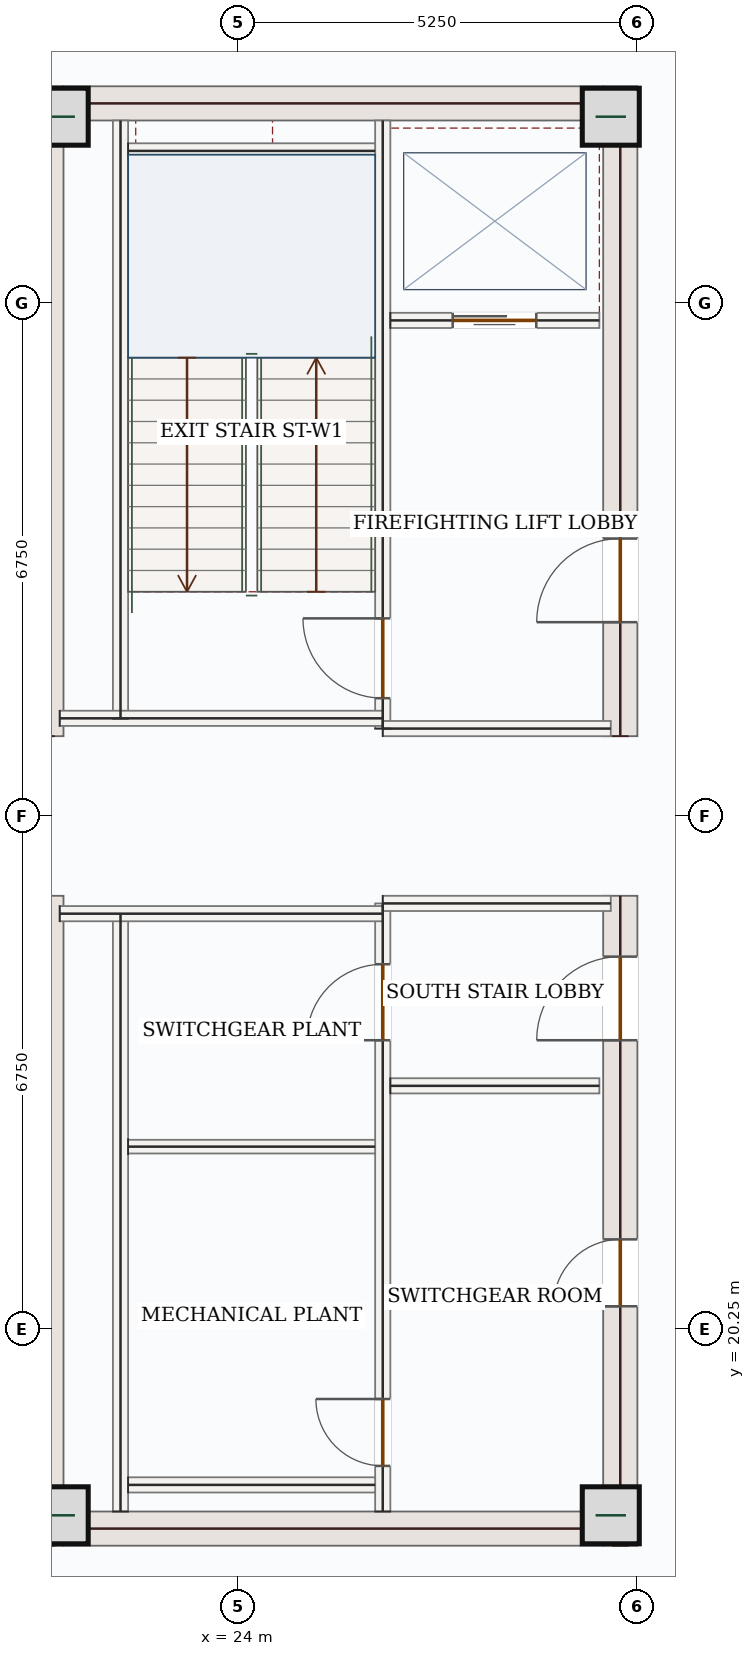
"""IFC4 building model, lengths in metres.
Left out: names, types, materials, properties, quantities, classifications, styles, units other than length and angle.
Written with IfcOpenShell. Run it as: python <this file> out.ifc"""

import sys

from ifc_helpers import new_model, si_unit, direction, frame, frame_2d, origin, origin_2d, place, context, subcontext, project, spatial, rectangle, extrude, source, transform, mapped, element, fill, save


model = new_model("IFC4")
c1 = context("Model", 3, precision=1e-05, world=origin(), true_north=direction((0.0, 1.0)))
c2 = subcontext(c1, "Body", "Model", "MODEL_VIEW")
j1 = project(units=[si_unit("LENGTHUNIT", "METRE"), si_unit("PLANEANGLEUNIT", "RADIAN")], contexts=[c1])
p1 = place(None, origin())
s1 = spatial("IfcSite", under=j1, at=p1, CompositionType="ELEMENT")
p2 = place(p1, origin())
s2 = spatial("IfcBuilding", under=s1, at=p2, CompositionType="ELEMENT")
p3 = place(p2, frame((0.0, 0.0, 375.15)))
s3 = spatial("IfcBuildingStorey", under=s2, at=p3, CompositionType="ELEMENT", Elevation=375.15)
m1 = source(origin(), c2, "Body", "SweptSolid", [
    extrude(rectangle(XDim=8.55, YDim=0.45, at=frame_2d((4.275, 0.0))), origin(), (0.0, 0.0, 1.0), 4.25),
])
for number, where, z_axis, x_axis in (
    (1, (21.475, 17.4, 0.0), (0.0, 0.0, 1.0), (0.0, 1.0, 0.0)),
    (2, (21.475, 28.05, 0.0), (0.0, 0.0, 1.0), (0.0, 1.0, 0.0)),
):
    element("IfcWall", number, at=place(p3, frame(where, z_axis=z_axis, x_axis=x_axis)), inside=s3, PredefinedType="SHEAR", context=c2, shape_type="MappedRepresentation", body=[
        mapped(m1, transform((0.0, 0.0, 0.0), x_axis=(1.0, 0.0, 0.0), y_axis=(0.0, 1.0, 0.0), z_axis=(0.0, 0.0, 1.0), scale=1.0)),
    ])
p4 = place(p3, frame((29.025, 17.4, 0.0), z_axis=(0.0, 0.0, 1.0), x_axis=(0.0, 1.0, 0.0)))
e3 = element("IfcWall", 3, at=p4, inside=s3, PredefinedType="SHEAR", context=c2, shape_type="SweptSolid", body=[
    extrude(rectangle(XDim=8.55, YDim=0.45, at=frame_2d((4.275, 0.0))), origin(), (0.0, 0.0, 1.0), 4.25),
])
p5 = place(p4, frame((6.65, 0.0, 0.0)))
e4 = element("IfcOpeningElement", 4, at=p5, cuts=e3, PredefinedType="OPENING", context=c2, shape_type="SweptSolid", body=[
    extrude(rectangle(XDim=1.1, YDim=2.2, at=frame_2d((0.55, 1.1))), frame((0.0, 0.235, 0.0), z_axis=(0.0, -1.0, 0.0), x_axis=(1.0, 0.0, 0.0)), (0.0, 0.0, 1.0), 0.47),
])
p6 = place(p4, frame((3.15, 0.0, 0.0)))
e5 = element("IfcOpeningElement", 5, at=p6, cuts=e3, PredefinedType="OPENING", context=c2, shape_type="SweptSolid", body=[
    extrude(rectangle(XDim=0.88, YDim=2.1, at=frame_2d((0.44, 1.05))), frame((0.0, 0.235, 0.0), z_axis=(0.0, -1.0, 0.0), x_axis=(1.0, 0.0, 0.0)), (0.0, 0.0, 1.0), 0.47),
])
p7 = place(p3, frame((29.025, 28.05, 0.0), z_axis=(0.0, 0.0, 1.0), x_axis=(0.0, 1.0, 0.0)))
e6 = element("IfcWall", 6, at=p7, inside=s3, PredefinedType="SHEAR", context=c2, shape_type="SweptSolid", body=[
    extrude(rectangle(XDim=8.55, YDim=0.45, at=frame_2d((4.275, 0.0))), origin(), (0.0, 0.0, 1.0), 4.25),
])
p8 = place(p7, frame((1.5, 0.0, 0.0)))
e7 = element("IfcOpeningElement", 7, at=p8, cuts=e6, PredefinedType="OPENING", context=c2, shape_type="SweptSolid", body=[
    extrude(rectangle(XDim=1.1, YDim=2.2, at=frame_2d((0.55, 1.1))), frame((0.0, 0.235, 0.0), z_axis=(0.0, -1.0, 0.0), x_axis=(1.0, 0.0, 0.0)), (0.0, 0.0, 1.0), 0.47),
])
m2 = source(origin(), c2, "Body", "SweptSolid", [
    extrude(rectangle(XDim=7.1, YDim=0.45, at=frame_2d((3.55, 0.0))), origin(), (0.0, 0.0, 1.0), 4.25),
])
for number, where, z_axis, x_axis in (
    (8, (21.7, 17.625, 0.0), (0.0, 0.0, 1.0), (1.0, 0.0, 0.0)),
    (9, (21.7, 36.375, 0.0), (0.0, 0.0, 1.0), (1.0, 0.0, 0.0)),
):
    element("IfcWall", number, at=place(p3, frame(where, z_axis=z_axis, x_axis=x_axis)), inside=s3, PredefinedType="SHEAR", context=c2, shape_type="MappedRepresentation", body=[
        mapped(m2, transform((0.0, 0.0, 0.0), x_axis=(1.0, 0.0, 0.0), y_axis=(0.0, 1.0, 0.0), z_axis=(0.0, 0.0, 1.0), scale=1.0)),
    ])
m3 = source(origin(), c2, "Body", "SweptSolid", [
    extrude(rectangle(XDim=0.75, YDim=0.75, at=origin_2d()), origin(), (0.0, 0.0, 1.0), 4.5),
])
for number, where, z_axis, x_axis in (
    (10, (21.65, 17.8, 0.0), (0.0, 0.0, 1.0), (1.0, 0.0, 0.0)),
    (11, (28.9, 17.8, 0.0), (0.0, 0.0, 1.0), (1.0, 0.0, 0.0)),
    (12, (21.65, 36.2, 0.0), (0.0, 0.0, 1.0), (1.0, 0.0, 0.0)),
    (13, (28.9, 36.2, 0.0), (0.0, 0.0, 1.0), (1.0, 0.0, 0.0)),
):
    element("IfcColumn", number, at=place(p3, frame(where, z_axis=z_axis, x_axis=x_axis)), inside=s3, PredefinedType="COLUMN", context=c2, shape_type="MappedRepresentation", body=[
        mapped(m3, transform((0.0, 0.0, 0.0), x_axis=(1.0, 0.0, 0.0), y_axis=(0.0, 1.0, 0.0), z_axis=(0.0, 0.0, 1.0), scale=1.0)),
    ])
m4 = source(origin(), c2, "Body", "SweptSolid", [
    extrude(rectangle(XDim=5.258, YDim=0.26, at=frame_2d((2.629, 0.0))), origin(), (0.0, 0.0, 1.0), 4.25),
])
for number, where, z_axis, x_axis in (
    (14, (22.658, 14.74, 0.0), (0.0, 0.0, 1.0), (-0.707, 0.707, 0.0)),
    (15, (18.94, 35.542, 0.0), (0.0, 0.0, 1.0), (0.707, 0.707, 0.0)),
):
    element("IfcWall", number, at=place(p3, frame(where, z_axis=z_axis, x_axis=x_axis)), inside=s3, PredefinedType="SOLIDWALL", context=c2, shape_type="MappedRepresentation", body=[
        mapped(m4, transform((0.0, 0.0, 0.0), x_axis=(1.0, 0.0, 0.0), y_axis=(0.0, 1.0, 0.0), z_axis=(0.0, 0.0, 1.0), scale=1.0)),
    ])
m5 = source(origin(), c2, "Body", "SweptSolid", [
    extrude(rectangle(XDim=7.87, YDim=0.2, at=frame_2d((3.935, 0.0))), origin(), (0.0, 0.0, 1.0), 4.25),
])
for number, where, z_axis, x_axis in (
    (16, (22.45, 17.85, 0.0), (0.0, 0.0, 1.0), (0.0, 1.0, 0.0)),
    (17, (22.45, 28.28, 0.0), (0.0, 0.0, 1.0), (0.0, 1.0, 0.0)),
):
    element("IfcWall", number, at=place(p3, frame(where, z_axis=z_axis, x_axis=x_axis)), inside=s3, PredefinedType="SOLIDWALL", context=c2, shape_type="MappedRepresentation", body=[
        mapped(m5, transform((0.0, 0.0, 0.0), x_axis=(1.0, 0.0, 0.0), y_axis=(0.0, 1.0, 0.0), z_axis=(0.0, 0.0, 1.0), scale=1.0)),
    ])
p9 = place(p3, frame((25.9, 17.85, 0.0), z_axis=(0.0, 0.0, 1.0), x_axis=(0.0, 1.0, 0.0)))
e18 = element("IfcWall", 18, at=p9, inside=s3, PredefinedType="SOLIDWALL", context=c2, shape_type="SweptSolid", body=[
    extrude(rectangle(XDim=8.0, YDim=0.2, at=frame_2d((4.0, 0.0))), origin(), (0.0, 0.0, 1.0), 4.25),
])
p10 = place(p9, frame((6.2, 0.0, 0.0)))
e19 = element("IfcOpeningElement", 19, at=p10, cuts=e18, PredefinedType="OPENING", context=c2, shape_type="SweptSolid", body=[
    extrude(rectangle(XDim=1.0, YDim=2.15, at=frame_2d((0.5, 1.075))), frame((0.0, 0.11, 0.0), z_axis=(0.0, -1.0, 0.0), x_axis=(1.0, 0.0, 0.0)), (0.0, 0.0, 1.0), 0.22),
])
p11 = place(p9, frame((0.6, 0.0, 0.0)))
e20 = element("IfcOpeningElement", 20, at=p11, cuts=e18, PredefinedType="OPENING", context=c2, shape_type="SweptSolid", body=[
    extrude(rectangle(XDim=0.88, YDim=2.1, at=frame_2d((0.44, 1.05))), frame((0.0, 0.11, 0.0), z_axis=(0.0, -1.0, 0.0), x_axis=(1.0, 0.0, 0.0)), (0.0, 0.0, 1.0), 0.22),
])
p12 = place(p3, frame((25.9, 28.15, 0.0), z_axis=(0.0, 0.0, 1.0), x_axis=(0.0, 1.0, 0.0)))
e21 = element("IfcWall", 21, at=p12, inside=s3, PredefinedType="SOLIDWALL", context=c2, shape_type="SweptSolid", body=[
    extrude(rectangle(XDim=8.0, YDim=0.2, at=frame_2d((4.0, 0.0))), origin(), (0.0, 0.0, 1.0), 4.25),
])
p13 = place(p12, frame((0.4, 0.0, 0.0)))
e22 = element("IfcOpeningElement", 22, at=p13, cuts=e21, PredefinedType="OPENING", context=c2, shape_type="SweptSolid", body=[
    extrude(rectangle(XDim=1.05, YDim=2.15, at=frame_2d((0.525, 1.075))), frame((0.0, 0.11, 0.0), z_axis=(0.0, -1.0, 0.0), x_axis=(1.0, 0.0, 0.0)), (0.0, 0.0, 1.0), 0.22),
])
m6 = source(origin(), c2, "Body", "SweptSolid", [
    extrude(rectangle(XDim=4.25, YDim=0.2, at=frame_2d((2.125, 0.0))), origin(), (0.0, 0.0, 1.0), 4.25),
])
p14 = place(p3, frame((21.65, 25.715, 0.0), z_axis=(0.0, 0.0, 1.0), x_axis=(1.0, 0.0, 0.0)))
e23 = element("IfcWall", 23, at=p14, inside=s3, PredefinedType="SOLIDWALL", context=c2, shape_type="MappedRepresentation", body=[
    mapped(m6, transform((0.0, 0.0, 0.0), x_axis=(1.0, 0.0, 0.0), y_axis=(0.0, 1.0, 0.0), z_axis=(0.0, 0.0, 1.0), scale=1.0)),
])
m7 = source(origin(), c2, "Body", "SweptSolid", [
    extrude(rectangle(XDim=3.0, YDim=0.2, at=frame_2d((1.5, 0.0))), origin(), (0.0, 0.0, 1.0), 4.25),
])
p15 = place(p3, frame((25.9, 25.85, 0.0), z_axis=(0.0, 0.0, 1.0), x_axis=(1.0, 0.0, 0.0)))
e24 = element("IfcWall", 24, at=p15, inside=s3, PredefinedType="SOLIDWALL", context=c2, shape_type="MappedRepresentation", body=[
    mapped(m7, transform((0.0, 0.0, 0.0), x_axis=(1.0, 0.0, 0.0), y_axis=(0.0, 1.0, 0.0), z_axis=(0.0, 0.0, 1.0), scale=1.0)),
])
p16 = place(p3, frame((21.65, 28.285, 0.0), z_axis=(0.0, 0.0, 1.0), x_axis=(1.0, 0.0, 0.0)))
e25 = element("IfcWall", 25, at=p16, inside=s3, PredefinedType="SOLIDWALL", context=c2, shape_type="MappedRepresentation", body=[
    mapped(m6, transform((0.0, 0.0, 0.0), x_axis=(1.0, 0.0, 0.0), y_axis=(0.0, 1.0, 0.0), z_axis=(0.0, 0.0, 1.0), scale=1.0)),
])
p17 = place(p3, frame((25.9, 28.15, 0.0), z_axis=(0.0, 0.0, 1.0), x_axis=(1.0, 0.0, 0.0)))
e26 = element("IfcWall", 26, at=p17, inside=s3, PredefinedType="SOLIDWALL", context=c2, shape_type="MappedRepresentation", body=[
    mapped(m7, transform((0.0, 0.0, 0.0), x_axis=(1.0, 0.0, 0.0), y_axis=(0.0, 1.0, 0.0), z_axis=(0.0, 0.0, 1.0), scale=1.0)),
])
m8 = source(origin(), c2, "Body", "SweptSolid", [
    extrude(rectangle(XDim=3.25, YDim=0.2, at=frame_2d((1.625, 0.0))), origin(), (0.0, 0.0, 1.0), 4.25),
])
for number, where, z_axis, x_axis in (
    (27, (22.55, 35.75, 0.0), (0.0, 0.0, 1.0), (1.0, 0.0, 0.0)),
    (28, (22.55, 18.2, 0.0), (0.0, 0.0, 1.0), (1.0, 0.0, 0.0)),
):
    element("IfcWall", number, at=place(p3, frame(where, z_axis=z_axis, x_axis=x_axis)), inside=s3, PredefinedType="SOLIDWALL", context=c2, shape_type="MappedRepresentation", body=[
        mapped(m8, transform((0.0, 0.0, 0.0), x_axis=(1.0, 0.0, 0.0), y_axis=(0.0, 1.0, 0.0), z_axis=(0.0, 0.0, 1.0), scale=1.0)),
    ])
m9 = source(origin(), c2, "Body", "SweptSolid", [
    extrude(rectangle(XDim=3.25, YDim=0.18, at=frame_2d((1.625, 0.0))), origin(), (0.0, 0.0, 1.0), 4.25),
])
p18 = place(p3, frame((22.55, 22.65, 0.0), z_axis=(0.0, 0.0, 1.0), x_axis=(1.0, 0.0, 0.0)))
e29 = element("IfcWall", 29, at=p18, inside=s3, PredefinedType="PARTITIONING", context=c2, shape_type="MappedRepresentation", body=[
    mapped(m9, transform((0.0, 0.0, 0.0), x_axis=(1.0, 0.0, 0.0), y_axis=(0.0, 1.0, 0.0), z_axis=(0.0, 0.0, 1.0), scale=1.0)),
])
p19 = place(p3, frame((26.0, 33.52, 0.0), z_axis=(0.0, 0.0, 1.0), x_axis=(1.0, 0.0, 0.0)))
e30 = element("IfcWall", 30, at=p19, inside=s3, PredefinedType="SOLIDWALL", context=c2, shape_type="SweptSolid", body=[
    extrude(rectangle(XDim=2.75, YDim=0.2, at=frame_2d((1.375, 0.0))), origin(), (0.0, 0.0, 1.0), 4.25),
])
p20 = place(p19, frame((0.82, 0.0, 0.0)))
e31 = element("IfcOpeningElement", 31, at=p20, cuts=e30, PredefinedType="OPENING", context=c2, shape_type="SweptSolid", body=[
    extrude(rectangle(XDim=1.1, YDim=2.15, at=frame_2d((0.55, 1.075))), frame((0.0, 0.11, 0.0), z_axis=(0.0, -1.0, 0.0), x_axis=(1.0, 0.0, 0.0)), (0.0, 0.0, 1.0), 0.22),
])
m10 = source(origin(), c2, "Body", "SweptSolid", [
    extrude(rectangle(XDim=2.75, YDim=0.2, at=frame_2d((1.375, 0.0))), origin(), (0.0, 0.0, 1.0), 4.25),
])
p21 = place(p3, frame((26.0, 23.45, 0.0), z_axis=(0.0, 0.0, 1.0), x_axis=(1.0, 0.0, 0.0)))
e32 = element("IfcWall", 32, at=p21, inside=s3, PredefinedType="SOLIDWALL", context=c2, shape_type="MappedRepresentation", body=[
    mapped(m10, transform((0.0, 0.0, 0.0), x_axis=(1.0, 0.0, 0.0), y_axis=(0.0, 1.0, 0.0), z_axis=(0.0, 0.0, 1.0), scale=1.0)),
])
m11 = source(origin(), c2, "Body", "SweptSolid", [
    extrude(rectangle(XDim=1.05, YDim=2.15, at=frame_2d((0.525, 1.075))), frame((0.0, 0.025, 0.0), z_axis=(0.0, -1.0, 0.0), x_axis=(1.0, 0.0, 0.0)), (0.0, 0.0, 1.0), 0.05),
])
p22 = place(p13, origin())
e33 = element("IfcDoor", 33, at=p22, inside=s3, OperationType="SINGLE_SWING_RIGHT", PredefinedType="DOOR", context=c2, shape_type="MappedRepresentation", body=[
    mapped(m11, transform((0.0, 0.0, 0.0), x_axis=(1.0, 0.0, 0.0), y_axis=(0.0, 1.0, 0.0), z_axis=(0.0, 0.0, 1.0), scale=1.0)),
])
fill(e22, e33)
m12 = source(origin(), c2, "Body", "SweptSolid", [
    extrude(rectangle(XDim=1.0, YDim=2.15, at=frame_2d((0.5, 1.075))), frame((0.0, 0.025, 0.0), z_axis=(0.0, -1.0, 0.0), x_axis=(1.0, 0.0, 0.0)), (0.0, 0.0, 1.0), 0.05),
])
p23 = place(p10, origin())
e34 = element("IfcDoor", 34, at=p23, inside=s3, OperationType="SINGLE_SWING_LEFT", PredefinedType="DOOR", context=c2, shape_type="MappedRepresentation", body=[
    mapped(m12, transform((0.0, 0.0, 0.0), x_axis=(1.0, 0.0, 0.0), y_axis=(0.0, 1.0, 0.0), z_axis=(0.0, 0.0, 1.0), scale=1.0)),
])
fill(e19, e34)
m13 = source(origin(), c2, "Body", "SweptSolid", [
    extrude(rectangle(XDim=0.88, YDim=2.1, at=frame_2d((0.44, 1.05))), frame((0.0, 0.025, 0.0), z_axis=(0.0, -1.0, 0.0), x_axis=(1.0, 0.0, 0.0)), (0.0, 0.0, 1.0), 0.05),
])
p24 = place(p11, origin())
e35 = element("IfcDoor", 35, at=p24, inside=s3, OperationType="SINGLE_SWING_RIGHT", PredefinedType="DOOR", context=c2, shape_type="MappedRepresentation", body=[
    mapped(m13, transform((0.0, 0.0, 0.0), x_axis=(1.0, 0.0, 0.0), y_axis=(0.0, 1.0, 0.0), z_axis=(0.0, 0.0, 1.0), scale=1.0)),
])
fill(e20, e35)
m14 = source(origin(), c2, "Body", "SweptSolid", [
    extrude(rectangle(XDim=1.1, YDim=2.15, at=frame_2d((0.55, 1.075))), frame((0.0, 0.025, 0.0), z_axis=(0.0, -1.0, 0.0), x_axis=(1.0, 0.0, 0.0)), (0.0, 0.0, 1.0), 0.05),
])
p25 = place(p20, origin())
e36 = element("IfcDoor", 36, at=p25, inside=s3, OperationType="DOUBLE_DOOR_SLIDING", PredefinedType="DOOR", context=c2, shape_type="MappedRepresentation", body=[
    mapped(m14, transform((0.0, 0.0, 0.0), x_axis=(1.0, 0.0, 0.0), y_axis=(0.0, 1.0, 0.0), z_axis=(0.0, 0.0, 1.0), scale=1.0)),
])
fill(e31, e36)
m15 = source(origin(), c2, "Body", "SweptSolid", [
    extrude(rectangle(XDim=1.1, YDim=2.2, at=frame_2d((0.55, 1.1))), frame((0.0, 0.025, 0.0), z_axis=(0.0, -1.0, 0.0), x_axis=(1.0, 0.0, 0.0)), (0.0, 0.0, 1.0), 0.05),
])
p26 = place(p8, origin())
e37 = element("IfcDoor", 37, at=p26, inside=s3, OperationType="SINGLE_SWING_LEFT", PredefinedType="DOOR", context=c2, shape_type="MappedRepresentation", body=[
    mapped(m15, transform((0.0, 0.0, 0.0), x_axis=(1.0, 0.0, 0.0), y_axis=(0.0, 1.0, 0.0), z_axis=(0.0, 0.0, 1.0), scale=1.0)),
])
fill(e7, e37)
p27 = place(p5, origin())
e38 = element("IfcDoor", 38, at=p27, inside=s3, OperationType="SINGLE_SWING_LEFT", PredefinedType="DOOR", context=c2, shape_type="MappedRepresentation", body=[
    mapped(m15, transform((0.0, 0.0, 0.0), x_axis=(1.0, 0.0, 0.0), y_axis=(0.0, 1.0, 0.0), z_axis=(0.0, 0.0, 1.0), scale=1.0)),
])
fill(e4, e38)
p28 = place(p6, origin())
e39 = element("IfcDoor", 39, at=p28, inside=s3, OperationType="SINGLE_SWING_LEFT", PredefinedType="DOOR", context=c2, shape_type="MappedRepresentation", body=[
    mapped(m13, transform((0.0, 0.0, 0.0), x_axis=(1.0, 0.0, 0.0), y_axis=(0.0, 1.0, 0.0), z_axis=(0.0, 0.0, 1.0), scale=1.0)),
])
fill(e5, e39)
save(model, sys.argv[1])
